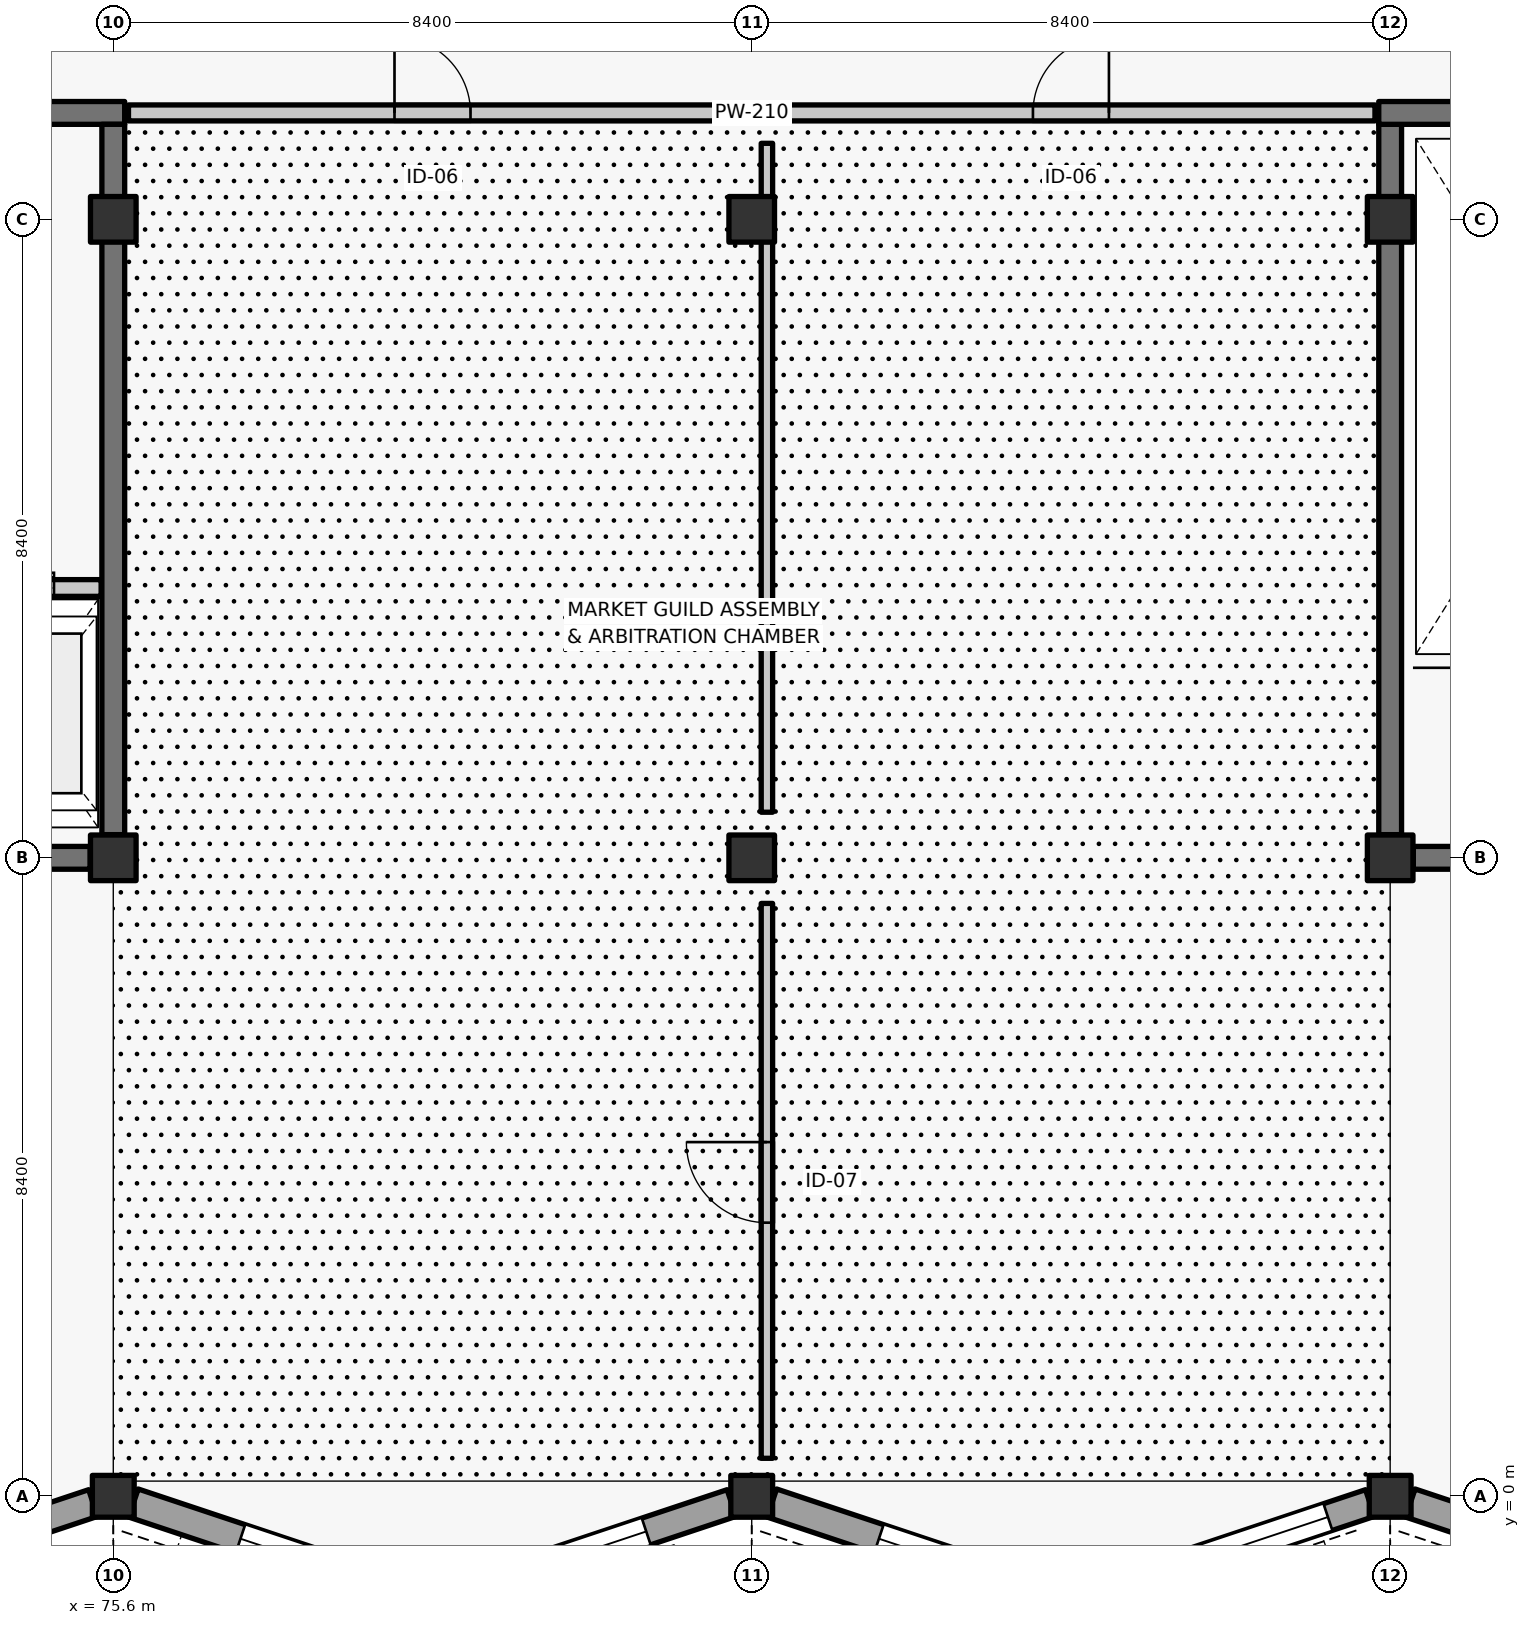
"""IFC4 building model, lengths in metres.
Left out: names, types, materials, properties, quantities, classifications, styles, units other than length and angle.
Written with IfcOpenShell. Run it as: python <this file> out.ifc"""

import sys

from ifc_helpers import new_model, si_unit, direction, frame, frame_2d, origin, origin_2d, place, context, subcontext, project, spatial, rectangle, extrude, element, fill, save


model = new_model("IFC4")
c1 = context("Model", 3, precision=1e-05, world=origin(), true_north=direction((0.0, 1.0)))
c2 = subcontext(c1, "Body", "Model", "MODEL_VIEW")
j1 = project(units=[si_unit("LENGTHUNIT", "METRE"), si_unit("PLANEANGLEUNIT", "RADIAN")], contexts=[c1])
p1 = place(None, origin())
s1 = spatial("IfcSite", under=j1, at=p1, CompositionType="ELEMENT")
p2 = place(p1, origin())
s2 = spatial("IfcBuilding", under=s1, at=p2, CompositionType="ELEMENT")
p3 = place(p2, frame((0.0, 0.0, 16.2)))
s3 = spatial("IfcBuildingStorey", under=s2, at=p3, CompositionType="ELEMENT", Elevation=16.2)
p4 = place(p3, frame((75.6, 0.0, 0.0), z_axis=(0.0, 0.0, 1.0), x_axis=(1.0, 0.0, 0.0)))
e1 = element("IfcColumn", 1, at=p4, inside=s3, PredefinedType="COLUMN", context=c2, shape_type="SweptSolid", body=[
    extrude(rectangle(XDim=0.55, YDim=0.55, at=origin_2d()), origin(), (0.0, 0.0, 1.0), 4.26),
])
for number, where, z_axis, x_axis in (
    (2, (75.6, 8.4, 0.0), (0.0, 0.0, 1.0), (1.0, 0.0, 0.0)),
    (3, (75.6, 16.8, 0.0), (0.0, 0.0, 1.0), (1.0, 0.0, 0.0)),
):
    element("IfcColumn", number, at=place(p3, frame(where, z_axis=z_axis, x_axis=x_axis)), inside=s3, PredefinedType="COLUMN", context=c2, shape_type="SweptSolid", body=[
        extrude(rectangle(XDim=0.6, YDim=0.6, at=origin_2d()), origin(), (0.0, 0.0, 1.0), 4.26),
    ])
p5 = place(p3, frame((84.0, 0.0, 0.0), z_axis=(0.0, 0.0, 1.0), x_axis=(1.0, 0.0, 0.0)))
e4 = element("IfcColumn", 4, at=p5, inside=s3, PredefinedType="COLUMN", context=c2, shape_type="SweptSolid", body=[
    extrude(rectangle(XDim=0.55, YDim=0.55, at=origin_2d()), origin(), (0.0, 0.0, 1.0), 4.26),
])
for number, where, z_axis, x_axis in (
    (5, (84.0, 8.4, 0.0), (0.0, 0.0, 1.0), (1.0, 0.0, 0.0)),
    (6, (84.0, 16.8, 0.0), (0.0, 0.0, 1.0), (1.0, 0.0, 0.0)),
):
    element("IfcColumn", number, at=place(p3, frame(where, z_axis=z_axis, x_axis=x_axis)), inside=s3, PredefinedType="COLUMN", context=c2, shape_type="SweptSolid", body=[
        extrude(rectangle(XDim=0.6, YDim=0.6, at=origin_2d()), origin(), (0.0, 0.0, 1.0), 4.26),
    ])
p6 = place(p3, frame((92.4, 0.0, 0.0), z_axis=(0.0, 0.0, 1.0), x_axis=(1.0, 0.0, 0.0)))
e7 = element("IfcColumn", 7, at=p6, inside=s3, PredefinedType="COLUMN", context=c2, shape_type="SweptSolid", body=[
    extrude(rectangle(XDim=0.55, YDim=0.55, at=origin_2d()), origin(), (0.0, 0.0, 1.0), 4.26),
])
for number, where, z_axis, x_axis in (
    (8, (92.4, 8.4, 0.0), (0.0, 0.0, 1.0), (1.0, 0.0, 0.0)),
    (9, (92.4, 16.8, 0.0), (0.0, 0.0, 1.0), (1.0, 0.0, 0.0)),
):
    element("IfcColumn", number, at=place(p3, frame(where, z_axis=z_axis, x_axis=x_axis)), inside=s3, PredefinedType="COLUMN", context=c2, shape_type="SweptSolid", body=[
        extrude(rectangle(XDim=0.6, YDim=0.6, at=origin_2d()), origin(), (0.0, 0.0, 1.0), 4.26),
    ])
p7 = place(p3, frame((75.334, -0.088, 0.0), z_axis=(0.0, 0.0, 1.0), x_axis=(-0.948683298051, -0.316227766017, 0.0)))
e10 = element("IfcWall", 10, at=p7, inside=s3, PredefinedType="SOLIDWALL", context=c2, shape_type="SweptSolid", body=[
    extrude(rectangle(XDim=4.147, YDim=0.37, at=frame_2d((2.074, 0.0))), origin(), (0.0, 0.0, 1.0), 4.26),
])
p8 = place(p7, frame((1.073, 0.0, 0.9)))
e11 = element("IfcOpeningElement", 11, at=p8, cuts=e10, PredefinedType="OPENING", context=c2, shape_type="SweptSolid", body=[
    extrude(rectangle(XDim=1.72, YDim=1.7, at=frame_2d((0.86, 0.85))), frame((0.0, 0.195, 0.0), z_axis=(0.0, -1.0, 0.0), x_axis=(1.0, 0.0, 0.0)), (0.0, 0.0, 1.0), 0.39),
])
p9 = place(p3, frame((79.8, -1.4, 0.0), z_axis=(0.0, 0.0, 1.0), x_axis=(-0.948683298051, 0.316227766017, 0.0)))
e12 = element("IfcWall", 12, at=p9, inside=s3, PredefinedType="SOLIDWALL", context=c2, shape_type="SweptSolid", body=[
    extrude(rectangle(XDim=4.147, YDim=0.39, at=frame_2d((2.074, 0.0))), origin(), (0.0, 0.0, 1.0), 4.26),
])
p10 = place(p9, frame((1.763, 0.0, 0.9)))
e13 = element("IfcOpeningElement", 13, at=p10, cuts=e12, PredefinedType="OPENING", context=c2, shape_type="SweptSolid", body=[
    extrude(rectangle(XDim=0.9, YDim=2.1, at=frame_2d((0.45, 1.05))), frame((0.0, 0.205, 0.0), z_axis=(0.0, -1.0, 0.0), x_axis=(1.0, 0.0, 0.0)), (0.0, 0.0, 1.0), 0.41),
])
p11 = place(p3, frame((83.734, -0.088, 0.0), z_axis=(0.0, 0.0, 1.0), x_axis=(-0.948677410965, -0.316245426727, 0.0)))
e14 = element("IfcWall", 14, at=p11, inside=s3, PredefinedType="SOLIDWALL", context=c2, shape_type="SweptSolid", body=[
    extrude(rectangle(XDim=4.147, YDim=0.37, at=frame_2d((2.074, 0.0))), origin(), (0.0, 0.0, 1.0), 4.26),
])
p12 = place(p11, frame((1.183, 0.0, 0.9)))
e15 = element("IfcOpeningElement", 15, at=p12, cuts=e14, PredefinedType="OPENING", context=c2, shape_type="SweptSolid", body=[
    extrude(rectangle(XDim=1.5, YDim=2.15, at=frame_2d((0.75, 1.075))), frame((0.0, 0.195, 0.0), z_axis=(0.0, -1.0, 0.0), x_axis=(1.0, 0.0, 0.0)), (0.0, 0.0, 1.0), 0.39),
])
p13 = place(p3, frame((88.2, -1.4, 0.0), z_axis=(0.0, 0.0, 1.0), x_axis=(-0.948677410965, 0.316245426727, 0.0)))
e16 = element("IfcWall", 16, at=p13, inside=s3, PredefinedType="SOLIDWALL", context=c2, shape_type="SweptSolid", body=[
    extrude(rectangle(XDim=4.147, YDim=0.39, at=frame_2d((2.074, 0.0))), origin(), (0.0, 0.0, 1.0), 4.26),
])
p14 = place(p13, frame((1.763, 0.0, 0.9)))
e17 = element("IfcOpeningElement", 17, at=p14, cuts=e16, PredefinedType="OPENING", context=c2, shape_type="SweptSolid", body=[
    extrude(rectangle(XDim=0.9, YDim=2.1, at=frame_2d((0.45, 1.05))), frame((0.0, 0.205, 0.0), z_axis=(0.0, -1.0, 0.0), x_axis=(1.0, 0.0, 0.0)), (0.0, 0.0, 1.0), 0.41),
])
p15 = place(p3, frame((92.135, -0.088, 0.0), z_axis=(0.0, 0.0, 1.0), x_axis=(-0.948683298051, -0.316227766017, 0.0)))
e18 = element("IfcWall", 18, at=p15, inside=s3, PredefinedType="SOLIDWALL", context=c2, shape_type="SweptSolid", body=[
    extrude(rectangle(XDim=4.147, YDim=0.37, at=frame_2d((2.074, 0.0))), origin(), (0.0, 0.0, 1.0), 4.26),
])
p16 = place(p15, frame((0.583, 0.0, 0.9)))
e19 = element("IfcOpeningElement", 19, at=p16, cuts=e18, PredefinedType="OPENING", context=c2, shape_type="SweptSolid", body=[
    extrude(rectangle(XDim=2.7, YDim=1.75, at=frame_2d((1.35, 0.875))), frame((0.0, 0.195, 0.0), z_axis=(0.0, -1.0, 0.0), x_axis=(1.0, 0.0, 0.0)), (0.0, 0.0, 1.0), 0.39),
])
p17 = place(p3, frame((96.6, -1.4, 0.0), z_axis=(0.0, 0.0, 1.0), x_axis=(-0.948683298051, 0.316227766017, 0.0)))
e20 = element("IfcWall", 20, at=p17, inside=s3, PredefinedType="SOLIDWALL", context=c2, shape_type="SweptSolid", body=[
    extrude(rectangle(XDim=4.147, YDim=0.39, at=frame_2d((2.074, 0.0))), origin(), (0.0, 0.0, 1.0), 4.26),
])
p18 = place(p17, frame((1.763, 0.0, 0.9)))
e21 = element("IfcOpeningElement", 21, at=p18, cuts=e20, PredefinedType="OPENING", context=c2, shape_type="SweptSolid", body=[
    extrude(rectangle(XDim=0.9, YDim=2.1, at=frame_2d((0.45, 1.05))), frame((0.0, 0.205, 0.0), z_axis=(0.0, -1.0, 0.0), x_axis=(1.0, 0.0, 0.0)), (0.0, 0.0, 1.0), 0.41),
])
p19 = place(p3, frame((75.295, 8.4, 0.0), z_axis=(0.0, 0.0, 1.0), x_axis=(-1.0, 0.0, 0.0)))
e22 = element("IfcWall", 22, at=p19, inside=s3, PredefinedType="SHEAR", context=c2, shape_type="SweptSolid", body=[
    extrude(rectangle(XDim=7.79, YDim=0.3, at=frame_2d((3.895, 0.0))), origin(), (0.0, 0.0, 1.0), 4.26),
])
p20 = place(p3, frame((67.05, 18.2, 0.0), z_axis=(0.0, 0.0, 1.0), x_axis=(1.0, 0.0, 0.0)))
e23 = element("IfcWall", 23, at=p20, inside=s3, PredefinedType="SHEAR", context=c2, shape_type="SweptSolid", body=[
    extrude(rectangle(XDim=8.7, YDim=0.3, at=frame_2d((4.35, 0.0))), origin(), (0.0, 0.0, 1.0), 4.26),
])
p21 = place(p20, frame((5.57, 0.0, 0.0)))
e24 = element("IfcOpeningElement", 24, at=p21, cuts=e23, PredefinedType="OPENING", context=c2, shape_type="SweptSolid", body=[
    extrude(rectangle(XDim=1.96, YDim=2.2, at=frame_2d((0.98, 1.1))), frame((0.0, 0.16, 0.0), z_axis=(0.0, -1.0, 0.0), x_axis=(1.0, 0.0, 0.0)), (0.0, 0.0, 1.0), 0.32),
])
p22 = place(p3, frame((75.6, 18.05, 0.0), z_axis=(0.0, 0.0, 1.0), x_axis=(0.0, -1.0, 0.0)))
e25 = element("IfcWall", 25, at=p22, inside=s3, PredefinedType="SHEAR", context=c2, shape_type="SweptSolid", body=[
    extrude(rectangle(XDim=9.345, YDim=0.3, at=frame_2d((4.672, 0.0))), origin(), (0.0, 0.0, 1.0), 4.26),
])
p23 = place(p3, frame((73.1, 11.95, 0.0), z_axis=(0.0, 0.0, 1.0), x_axis=(1.0, 0.0, 0.0)))
e26 = element("IfcWall", 26, at=p23, inside=s3, PredefinedType="SOLIDWALL", context=c2, shape_type="SweptSolid", body=[
    extrude(rectangle(XDim=2.34, YDim=0.22, at=frame_2d((1.17, 0.0))), origin(), (0.0, 0.0, 1.0), 4.26),
])
p24 = place(p23, frame((0.62, 0.0, 0.0)))
e27 = element("IfcOpeningElement", 27, at=p24, cuts=e26, PredefinedType="OPENING", context=c2, shape_type="SweptSolid", body=[
    extrude(rectangle(XDim=1.1, YDim=2.2, at=frame_2d((0.55, 1.1))), frame((0.0, 0.12, 0.0), z_axis=(0.0, -1.0, 0.0), x_axis=(1.0, 0.0, 0.0)), (0.0, 0.0, 1.0), 0.24),
])
p25 = place(p3, frame((100.495, 8.4, 0.0), z_axis=(0.0, 0.0, 1.0), x_axis=(-1.0, 0.0, 0.0)))
e28 = element("IfcWall", 28, at=p25, inside=s3, PredefinedType="SHEAR", context=c2, shape_type="SweptSolid", body=[
    extrude(rectangle(XDim=7.79, YDim=0.3, at=frame_2d((3.895, 0.0))), origin(), (0.0, 0.0, 1.0), 4.26),
])
p26 = place(p3, frame((92.4, 8.705, 0.0), z_axis=(0.0, 0.0, 1.0), x_axis=(0.0, 1.0, 0.0)))
e29 = element("IfcWall", 29, at=p26, inside=s3, PredefinedType="SHEAR", context=c2, shape_type="SweptSolid", body=[
    extrude(rectangle(XDim=9.345, YDim=0.3, at=frame_2d((4.672, 0.0))), origin(), (0.0, 0.0, 1.0), 4.26),
])
p27 = place(p3, frame((92.25, 18.2, 0.0), z_axis=(0.0, 0.0, 1.0), x_axis=(1.0, 0.0, 0.0)))
e30 = element("IfcWall", 30, at=p27, inside=s3, PredefinedType="SHEAR", context=c2, shape_type="SweptSolid", body=[
    extrude(rectangle(XDim=8.7, YDim=0.3, at=frame_2d((4.35, 0.0))), origin(), (0.0, 0.0, 1.0), 4.26),
])
p28 = place(p27, frame((5.57, 0.0, 0.0)))
e31 = element("IfcOpeningElement", 31, at=p28, cuts=e30, PredefinedType="OPENING", context=c2, shape_type="SweptSolid", body=[
    extrude(rectangle(XDim=1.96, YDim=2.2, at=frame_2d((0.98, 1.1))), frame((0.0, 0.16, 0.0), z_axis=(0.0, -1.0, 0.0), x_axis=(1.0, 0.0, 0.0)), (0.0, 0.0, 1.0), 0.32),
])
p29 = place(p3, frame((75.8, 18.2, 0.0), z_axis=(0.0, 0.0, 1.0), x_axis=(1.0, 0.0, 0.0)))
e32 = element("IfcWall", 32, at=p29, inside=s3, PredefinedType="PARTITIONING", context=c2, shape_type="SweptSolid", body=[
    extrude(rectangle(XDim=16.4, YDim=0.21, at=frame_2d((8.2, 0.0))), origin(), (0.0, 0.0, 1.0), 4.26),
])
p30 = place(p29, frame((3.5, 0.0, 0.0)))
e33 = element("IfcOpeningElement", 33, at=p30, cuts=e32, PredefinedType="OPENING", context=c2, shape_type="SweptSolid", body=[
    extrude(rectangle(XDim=1.0, YDim=2.15, at=frame_2d((0.5, 1.075))), frame((0.0, 0.115, 0.0), z_axis=(0.0, -1.0, 0.0), x_axis=(1.0, 0.0, 0.0)), (0.0, 0.0, 1.0), 0.23),
])
p31 = place(p29, frame((11.9, 0.0, 0.0)))
e34 = element("IfcOpeningElement", 34, at=p31, cuts=e32, PredefinedType="OPENING", context=c2, shape_type="SweptSolid", body=[
    extrude(rectangle(XDim=1.0, YDim=2.15, at=frame_2d((0.5, 1.075))), frame((0.0, 0.115, 0.0), z_axis=(0.0, -1.0, 0.0), x_axis=(1.0, 0.0, 0.0)), (0.0, 0.0, 1.0), 0.23),
])
p32 = place(p3, frame((84.2, 0.5, 0.0), z_axis=(0.0, 0.0, 1.0), x_axis=(0.0, 1.0, 0.0)))
e35 = element("IfcWall", 35, at=p32, inside=s3, PredefinedType="PARTITIONING", context=c2, shape_type="SweptSolid", body=[
    extrude(rectangle(XDim=7.3, YDim=0.15, at=frame_2d((3.65, 0.0))), origin(), (0.0, 0.0, 1.0), 4.26),
])
p33 = place(p32, frame((3.1, 0.0, 0.0)))
e36 = element("IfcOpeningElement", 36, at=p33, cuts=e35, PredefinedType="OPENING", context=c2, shape_type="SweptSolid", body=[
    extrude(rectangle(XDim=1.06, YDim=2.18, at=frame_2d((0.53, 1.09))), frame((0.0, 0.085, 0.0), z_axis=(0.0, -1.0, 0.0), x_axis=(1.0, 0.0, 0.0)), (0.0, 0.0, 1.0), 0.17),
])
p34 = place(p3, frame((84.2, 9.0, 0.0), z_axis=(0.0, 0.0, 1.0), x_axis=(0.0, 1.0, 0.0)))
e37 = element("IfcWall", 37, at=p34, inside=s3, PredefinedType="PARTITIONING", context=c2, shape_type="SweptSolid", body=[
    extrude(rectangle(XDim=8.8, YDim=0.15, at=frame_2d((4.4, 0.0))), origin(), (0.0, 0.0, 1.0), 4.26),
])
p35 = place(p10, origin())
e38 = element("IfcWindow", 38, at=p35, inside=s3, PartitioningType="SINGLE_PANEL", PredefinedType="WINDOW", context=c2, shape_type="SweptSolid", body=[
    extrude(rectangle(XDim=0.9, YDim=2.1, at=frame_2d((0.45, 1.05))), frame((0.0, 0.03, 0.0), z_axis=(0.0, -1.0, 0.0), x_axis=(1.0, 0.0, 0.0)), (0.0, 0.0, 1.0), 0.06),
])
fill(e13, e38)
p36 = place(p12, origin())
e39 = element("IfcWindow", 39, at=p36, inside=s3, PartitioningType="SINGLE_PANEL", PredefinedType="WINDOW", context=c2, shape_type="SweptSolid", body=[
    extrude(rectangle(XDim=1.5, YDim=2.15, at=frame_2d((0.75, 1.075))), frame((0.0, 0.03, 0.0), z_axis=(0.0, -1.0, 0.0), x_axis=(1.0, 0.0, 0.0)), (0.0, 0.0, 1.0), 0.06),
])
fill(e15, e39)
p37 = place(p14, origin())
e40 = element("IfcWindow", 40, at=p37, inside=s3, PartitioningType="SINGLE_PANEL", PredefinedType="WINDOW", context=c2, shape_type="SweptSolid", body=[
    extrude(rectangle(XDim=0.9, YDim=2.1, at=frame_2d((0.45, 1.05))), frame((0.0, 0.03, 0.0), z_axis=(0.0, -1.0, 0.0), x_axis=(1.0, 0.0, 0.0)), (0.0, 0.0, 1.0), 0.06),
])
fill(e17, e40)
p38 = place(p16, origin())
e41 = element("IfcWindow", 41, at=p38, inside=s3, PartitioningType="SINGLE_PANEL", PredefinedType="WINDOW", context=c2, shape_type="SweptSolid", body=[
    extrude(rectangle(XDim=2.7, YDim=1.75, at=frame_2d((1.35, 0.875))), frame((0.0, 0.03, 0.0), z_axis=(0.0, -1.0, 0.0), x_axis=(1.0, 0.0, 0.0)), (0.0, 0.0, 1.0), 0.06),
])
fill(e19, e41)
p39 = place(p24, origin())
e42 = element("IfcDoor", 42, at=p39, inside=s3, OperationType="SLIDING_TO_RIGHT", PredefinedType="DOOR", context=c2, shape_type="SweptSolid", body=[
    extrude(rectangle(XDim=1.1, YDim=2.2, at=frame_2d((0.55, 1.1))), frame((0.0, 0.025, 0.0), z_axis=(0.0, -1.0, 0.0), x_axis=(1.0, 0.0, 0.0)), (0.0, 0.0, 1.0), 0.05),
])
fill(e27, e42)
p40 = place(p30, origin())
e43 = element("IfcDoor", 43, at=p40, inside=s3, OperationType="SINGLE_SWING_LEFT", PredefinedType="DOOR", context=c2, shape_type="SweptSolid", body=[
    extrude(rectangle(XDim=1.0, YDim=2.15, at=frame_2d((0.5, 1.075))), frame((0.0, 0.025, 0.0), z_axis=(0.0, -1.0, 0.0), x_axis=(1.0, 0.0, 0.0)), (0.0, 0.0, 1.0), 0.05),
])
fill(e33, e43)
p41 = place(p31, origin())
e44 = element("IfcDoor", 44, at=p41, inside=s3, OperationType="SINGLE_SWING_RIGHT", PredefinedType="DOOR", context=c2, shape_type="SweptSolid", body=[
    extrude(rectangle(XDim=1.0, YDim=2.15, at=frame_2d((0.5, 1.075))), frame((0.0, 0.025, 0.0), z_axis=(0.0, -1.0, 0.0), x_axis=(1.0, 0.0, 0.0)), (0.0, 0.0, 1.0), 0.05),
])
fill(e34, e44)
p42 = place(p33, origin())
e45 = element("IfcDoor", 45, at=p42, inside=s3, OperationType="SINGLE_SWING_RIGHT", PredefinedType="DOOR", context=c2, shape_type="SweptSolid", body=[
    extrude(rectangle(XDim=1.06, YDim=2.18, at=frame_2d((0.53, 1.09))), frame((0.0, 0.025, 0.0), z_axis=(0.0, -1.0, 0.0), x_axis=(1.0, 0.0, 0.0)), (0.0, 0.0, 1.0), 0.05),
])
fill(e36, e45)
save(model, sys.argv[1])
